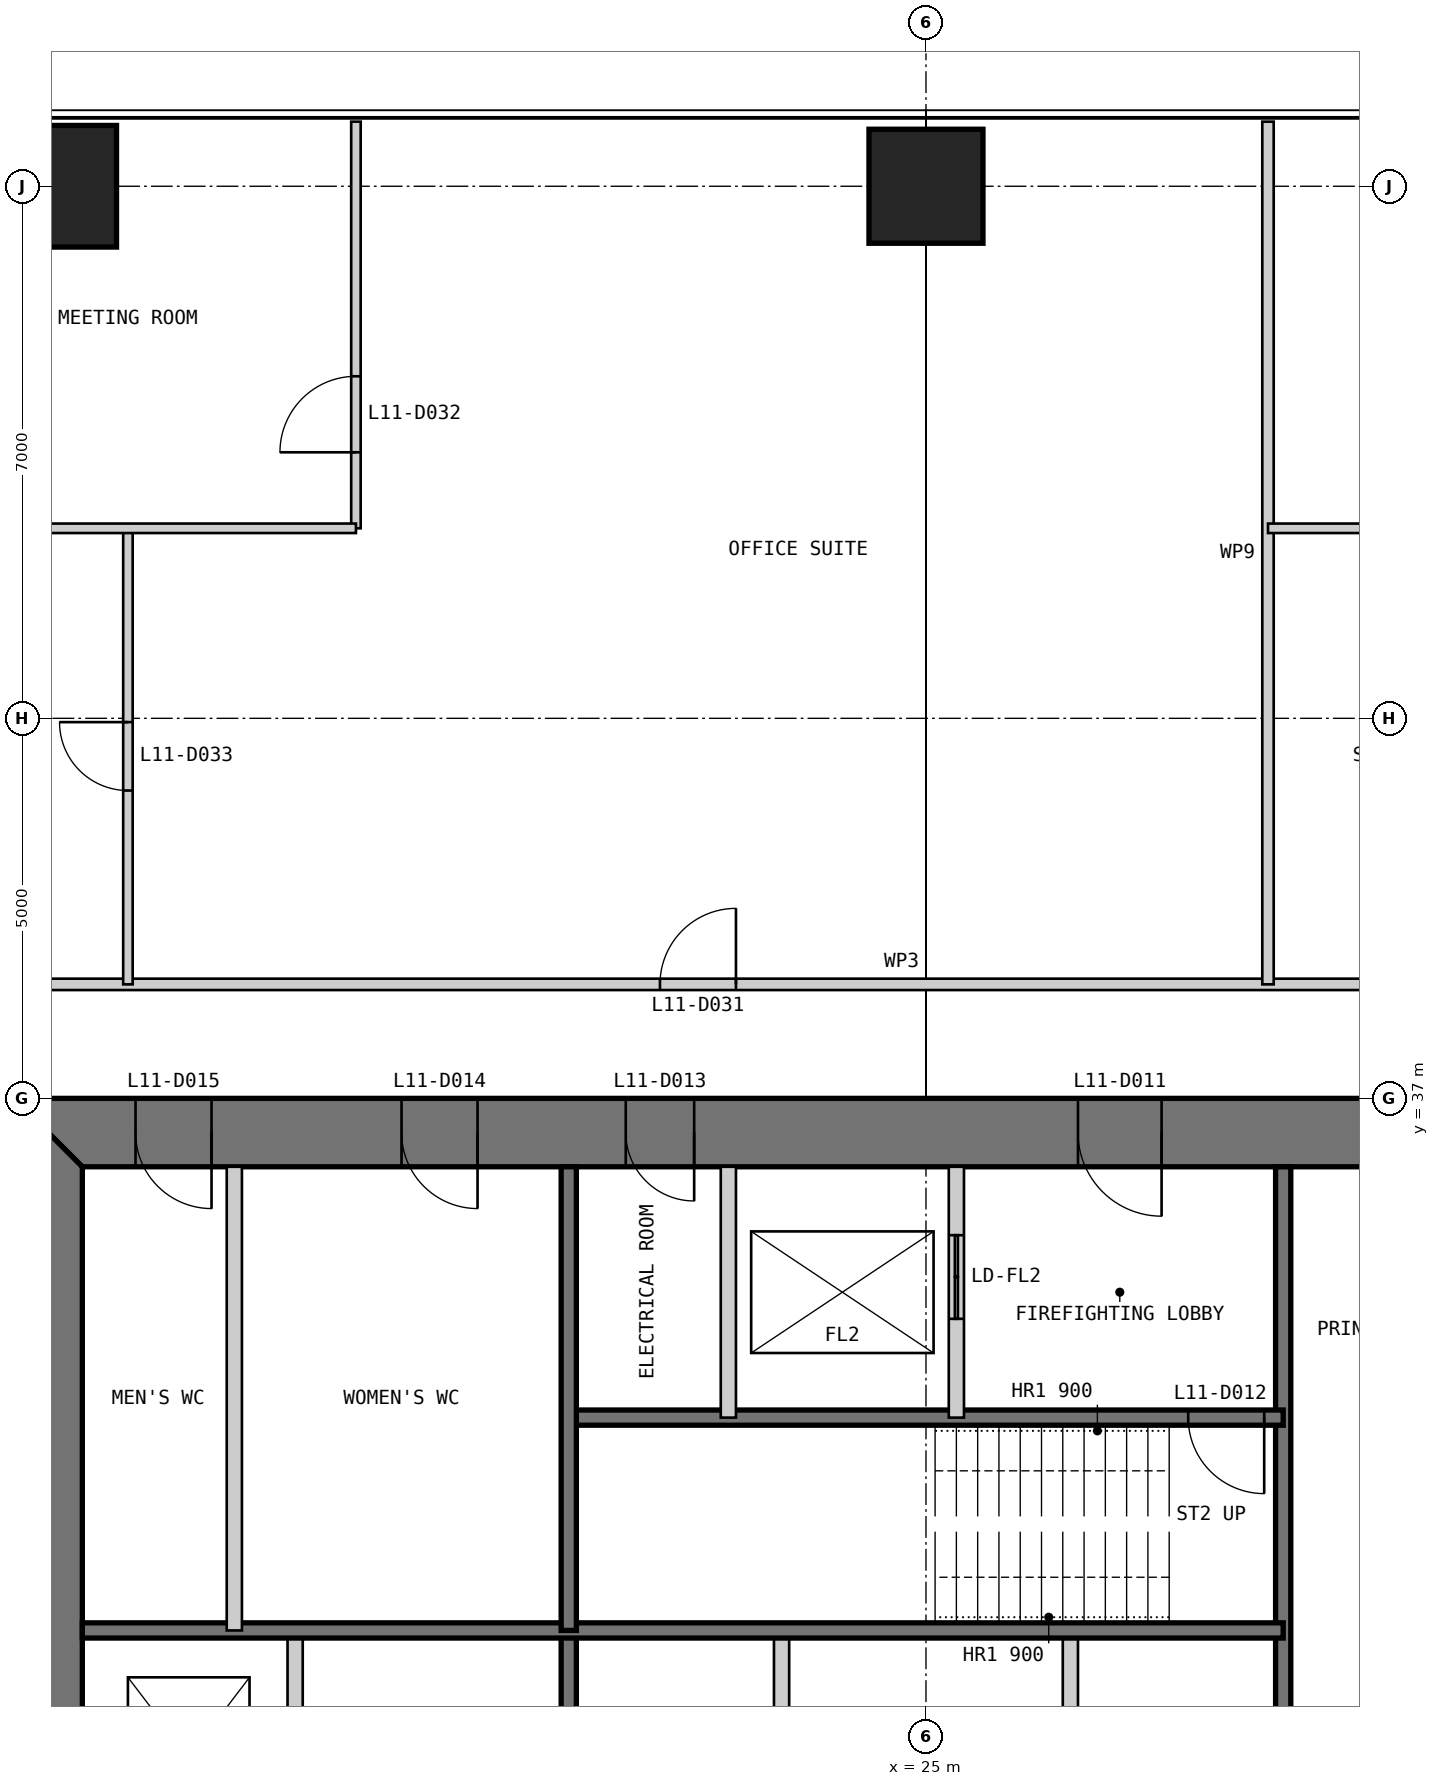
"""IFC4 building model, lengths in metres.
Left out: names, types, materials, properties, quantities, classifications, styles, units other than length and angle.
Written with IfcOpenShell. Run it as: python <this file> out.ifc"""

import sys

from ifc_helpers import new_model, si_unit, direction, frame, frame_2d, origin, origin_2d, place, context, subcontext, project, spatial, polyline, rectangle, outline, extrude, element, fill, save


model = new_model("IFC4")
c1 = context("Model", 3, precision=1e-05, world=origin(), true_north=direction((0.0, 1.0)))
c2 = subcontext(c1, "Body", "Model", "MODEL_VIEW")
j1 = project(units=[si_unit("LENGTHUNIT", "METRE"), si_unit("PLANEANGLEUNIT", "RADIAN")], contexts=[c1])
p1 = place(None, origin())
s1 = spatial("IfcSite", under=j1, at=p1, CompositionType="ELEMENT")
p2 = place(p1, origin())
s2 = spatial("IfcBuilding", under=s1, at=p2, CompositionType="ELEMENT")
p3 = place(p2, frame((0.0, 0.0, 51.0)))
s3 = spatial("IfcBuildingStorey", under=s2, at=p3, CompositionType="ELEMENT", Elevation=51.0)
p4 = place(p3, frame((25.0, 49.0, 0.0), z_axis=(0.0, 0.0, 1.0), x_axis=(1.0, 0.0, 0.0)))
e1 = element("IfcColumn", 1, at=p4, inside=s3, PredefinedType="COLUMN", context=c2, shape_type="SweptSolid", body=[
    extrude(rectangle(XDim=1.5, YDim=1.5, at=origin_2d()), origin(), (0.0, 0.0, 1.0), 4.0),
])
p5 = place(p3, frame((13.0, 49.0, 0.0), z_axis=(0.0, 0.0, 1.0), x_axis=(1.0, 0.0, 0.0)))
e2 = element("IfcColumn", 2, at=p5, inside=s3, PredefinedType="COLUMN", context=c2, shape_type="SweptSolid", body=[
    extrude(rectangle(XDim=2.7, YDim=1.6, at=origin_2d()), origin(), (0.0, 0.0, 1.0), 4.0),
])
p6 = place(p3, frame((37.0, 36.55, 0.0), z_axis=(0.0, 0.0, 1.0), x_axis=(-1.0, 0.0, 0.0)))
e3 = element("IfcWall", 3, at=p6, inside=s3, PredefinedType="SHEAR", context=c2, shape_type="SweptSolid", body=[
    extrude(outline(polyline([(0.0, -0.45), (24.0, -0.45), (23.1, 0.45), (0.9, 0.45), (0.0, -0.45)])), origin(), (0.0, 0.0, 1.0), 4.0),
])
p7 = place(p6, frame((4.9, 0.0, 0.0)))
e4 = element("IfcOpeningElement", 4, at=p7, cuts=e3, PredefinedType="OPENING", context=c2, shape_type="SweptSolid", body=[
    extrude(rectangle(XDim=1.0, YDim=2.2, at=frame_2d((0.5, 1.1))), frame((0.0, 0.46, 0.0), z_axis=(0.0, -1.0, 0.0), x_axis=(1.0, 0.0, 0.0)), (0.0, 0.0, 1.0), 0.92),
])
p8 = place(p6, frame((8.9, 0.0, 0.0)))
e5 = element("IfcOpeningElement", 5, at=p8, cuts=e3, PredefinedType="OPENING", context=c2, shape_type="SweptSolid", body=[
    extrude(rectangle(XDim=1.1, YDim=2.2, at=frame_2d((0.55, 1.1))), frame((0.0, 0.46, 0.0), z_axis=(0.0, -1.0, 0.0), x_axis=(1.0, 0.0, 0.0)), (0.0, 0.0, 1.0), 0.92),
])
p9 = place(p6, frame((15.05, 0.0, 0.0)))
e6 = element("IfcOpeningElement", 6, at=p9, cuts=e3, PredefinedType="OPENING", context=c2, shape_type="SweptSolid", body=[
    extrude(rectangle(XDim=0.9, YDim=2.2, at=frame_2d((0.45, 1.1))), frame((0.0, 0.46, 0.0), z_axis=(0.0, -1.0, 0.0), x_axis=(1.0, 0.0, 0.0)), (0.0, 0.0, 1.0), 0.92),
])
p10 = place(p6, frame((17.9, 0.0, 0.0)))
e7 = element("IfcOpeningElement", 7, at=p10, cuts=e3, PredefinedType="OPENING", context=c2, shape_type="SweptSolid", body=[
    extrude(rectangle(XDim=1.0, YDim=2.2, at=frame_2d((0.5, 1.1))), frame((0.0, 0.46, 0.0), z_axis=(0.0, -1.0, 0.0), x_axis=(1.0, 0.0, 0.0)), (0.0, 0.0, 1.0), 0.92),
])
p11 = place(p6, frame((21.4, 0.0, 0.0)))
e8 = element("IfcOpeningElement", 8, at=p11, cuts=e3, PredefinedType="OPENING", context=c2, shape_type="SweptSolid", body=[
    extrude(rectangle(XDim=1.0, YDim=2.2, at=frame_2d((0.5, 1.1))), frame((0.0, 0.46, 0.0), z_axis=(0.0, -1.0, 0.0), x_axis=(1.0, 0.0, 0.0)), (0.0, 0.0, 1.0), 0.92),
])
p12 = place(p3, frame((13.45, 36.1, 0.0), z_axis=(0.0, 0.0, 1.0), x_axis=(0.0, -1.0, 0.0)))
e9 = element("IfcWall", 9, at=p12, inside=s3, PredefinedType="SHEAR", context=c2, shape_type="SweptSolid", body=[
    extrude(outline(polyline([(-0.9, -0.45), (23.1, -0.45), (22.2, 0.45), (0.0, 0.45), (-0.9, -0.45)])), origin(), (0.0, 0.0, 1.0), 4.0),
])
p13 = place(p12, frame((20.2, 0.0, 0.0)))
e10 = element("IfcOpeningElement", 10, at=p13, cuts=e9, PredefinedType="OPENING", context=c2, shape_type="SweptSolid", body=[
    extrude(rectangle(XDim=1.0, YDim=2.2, at=frame_2d((0.5, 1.1))), frame((0.0, 0.46, 0.0), z_axis=(0.0, -1.0, 0.0), x_axis=(1.0, 0.0, 0.0)), (0.0, 0.0, 1.0), 0.92),
])
p14 = place(p12, frame((17.25, 0.0, 0.0)))
e11 = element("IfcOpeningElement", 11, at=p14, cuts=e9, PredefinedType="OPENING", context=c2, shape_type="SweptSolid", body=[
    extrude(rectangle(XDim=0.9, YDim=2.2, at=frame_2d((0.45, 1.1))), frame((0.0, 0.46, 0.0), z_axis=(0.0, -1.0, 0.0), x_axis=(1.0, 0.0, 0.0)), (0.0, 0.0, 1.0), 0.92),
])
p15 = place(p3, frame((16.7, 13.9, 0.0), z_axis=(0.0, 0.0, 1.0), x_axis=(0.0, 1.0, 0.0)))
e12 = element("IfcWall", 12, at=p15, inside=s3, PredefinedType="PARTITIONING", context=c2, shape_type="SweptSolid", body=[
    extrude(rectangle(XDim=16.1, YDim=0.2, at=frame_2d((8.05, 0.0))), origin(), (0.0, 0.0, 1.0), 3.8),
])
p16 = place(p15, frame((4.1, 0.0, 0.0)))
e13 = element("IfcOpeningElement", 13, at=p16, cuts=e12, PredefinedType="OPENING", context=c2, shape_type="SweptSolid", body=[
    extrude(rectangle(XDim=0.9, YDim=2.2, at=frame_2d((0.45, 1.1))), frame((0.0, 0.11, 0.0), z_axis=(0.0, -1.0, 0.0), x_axis=(1.0, 0.0, 0.0)), (0.0, 0.0, 1.0), 0.22),
])
p17 = place(p15, frame((7.217, 0.0, 0.0)))
e14 = element("IfcOpeningElement", 14, at=p17, cuts=e12, PredefinedType="OPENING", context=c2, shape_type="SweptSolid", body=[
    extrude(rectangle(XDim=1.1, YDim=2.2, at=frame_2d((0.55, 1.1))), frame((0.0, 0.11, 0.0), z_axis=(0.0, -1.0, 0.0), x_axis=(1.0, 0.0, 0.0)), (0.0, 0.0, 1.0), 0.22),
])
p18 = place(p15, frame((10.55, 0.0, 0.0)))
e15 = element("IfcOpeningElement", 15, at=p18, cuts=e12, PredefinedType="OPENING", context=c2, shape_type="SweptSolid", body=[
    extrude(rectangle(XDim=1.1, YDim=2.2, at=frame_2d((0.55, 1.1))), frame((0.0, 0.11, 0.0), z_axis=(0.0, -1.0, 0.0), x_axis=(1.0, 0.0, 0.0)), (0.0, 0.0, 1.0), 0.22),
])
p19 = place(p15, frame((13.883, 0.0, 0.0)))
e16 = element("IfcOpeningElement", 16, at=p19, cuts=e12, PredefinedType="OPENING", context=c2, shape_type="SweptSolid", body=[
    extrude(rectangle(XDim=1.1, YDim=2.2, at=frame_2d((0.55, 1.1))), frame((0.0, 0.11, 0.0), z_axis=(0.0, -1.0, 0.0), x_axis=(1.0, 0.0, 0.0)), (0.0, 0.0, 1.0), 0.22),
])
p20 = place(p3, frame((20.3, 13.9, 0.0), z_axis=(0.0, 0.0, 1.0), x_axis=(0.0, 1.0, 0.0)))
e17 = element("IfcWall", 17, at=p20, inside=s3, PredefinedType="SOLIDWALL", context=c2, shape_type="SweptSolid", body=[
    extrude(rectangle(XDim=16.1, YDim=0.2, at=frame_2d((8.05, 0.0))), origin(), (0.0, 0.0, 1.0), 3.8),
])
p21 = place(p3, frame((23.1, 20.0, 0.0), z_axis=(0.0, 0.0, 1.0), x_axis=(0.0, 1.0, 0.0)))
e18 = element("IfcWall", 18, at=p21, inside=s3, PredefinedType="PARTITIONING", context=c2, shape_type="SweptSolid", body=[
    extrude(rectangle(XDim=10.0, YDim=0.2, at=frame_2d((5.0, 0.0))), origin(), (0.0, 0.0, 1.0), 3.8),
])
p22 = place(p3, frame((29.7, 36.1, 0.0), z_axis=(0.0, 0.0, 1.0), x_axis=(0.0, -1.0, 0.0)))
e19 = element("IfcWall", 19, at=p22, inside=s3, PredefinedType="SOLIDWALL", context=c2, shape_type="SweptSolid", body=[
    extrude(rectangle(XDim=16.1, YDim=0.2, at=frame_2d((8.05, 0.0))), origin(), (0.0, 0.0, 1.0), 3.8),
])
p23 = place(p3, frame((26.9, 30.0, 0.0), z_axis=(0.0, 0.0, 1.0), x_axis=(0.0, -1.0, 0.0)))
e20 = element("IfcWall", 20, at=p23, inside=s3, PredefinedType="PARTITIONING", context=c2, shape_type="SweptSolid", body=[
    extrude(rectangle(XDim=10.0, YDim=0.2, at=frame_2d((5.0, 0.0))), origin(), (0.0, 0.0, 1.0), 3.8),
])
p24 = place(p3, frame((29.7, 32.8, 0.0), z_axis=(0.0, 0.0, 1.0), x_axis=(-1.0, 0.0, 0.0)))
e21 = element("IfcWall", 21, at=p24, inside=s3, PredefinedType="SOLIDWALL", context=c2, shape_type="SweptSolid", body=[
    extrude(rectangle(XDim=9.4, YDim=0.2, at=frame_2d((4.7, 0.0))), origin(), (0.0, 0.0, 1.0), 3.8),
])
p25 = place(p24, frame((0.25, 0.0, 0.0)))
e22 = element("IfcOpeningElement", 22, at=p25, cuts=e21, PredefinedType="OPENING", context=c2, shape_type="SweptSolid", body=[
    extrude(rectangle(XDim=1.0, YDim=2.2, at=frame_2d((0.5, 1.1))), frame((0.0, 0.11, 0.0), z_axis=(0.0, -1.0, 0.0), x_axis=(1.0, 0.0, 0.0)), (0.0, 0.0, 1.0), 0.22),
])
p26 = place(p3, frame((29.7, 30.0, 0.0), z_axis=(0.0, 0.0, 1.0), x_axis=(-1.0, 0.0, 0.0)))
e23 = element("IfcWall", 23, at=p26, inside=s3, PredefinedType="SOLIDWALL", context=c2, shape_type="SweptSolid", body=[
    extrude(rectangle(XDim=15.8, YDim=0.2, at=frame_2d((7.9, 0.0))), origin(), (0.0, 0.0, 1.0), 3.8),
])
p27 = place(p3, frame((25.4, 36.1, 0.0), z_axis=(0.0, 0.0, 1.0), x_axis=(0.0, -1.0, 0.0)))
e24 = element("IfcWall", 24, at=p27, inside=s3, PredefinedType="PARTITIONING", context=c2, shape_type="SweptSolid", body=[
    extrude(rectangle(XDim=3.3, YDim=0.2, at=frame_2d((1.65, 0.0))), origin(), (0.0, 0.0, 1.0), 3.8),
])
p28 = place(p27, frame((0.9, 0.0, 0.0)))
e25 = element("IfcOpeningElement", 25, at=p28, cuts=e24, PredefinedType="OPENING", context=c2, shape_type="SweptSolid", body=[
    extrude(rectangle(XDim=1.1, YDim=2.2, at=frame_2d((0.55, 1.1))), frame((0.0, 0.11, 0.0), z_axis=(0.0, -1.0, 0.0), x_axis=(1.0, 0.0, 0.0)), (0.0, 0.0, 1.0), 0.22),
])
p29 = place(p3, frame((22.4, 36.1, 0.0), z_axis=(0.0, 0.0, 1.0), x_axis=(0.0, -1.0, 0.0)))
e26 = element("IfcWall", 26, at=p29, inside=s3, PredefinedType="PARTITIONING", context=c2, shape_type="SweptSolid", body=[
    extrude(rectangle(XDim=3.3, YDim=0.2, at=frame_2d((1.65, 0.0))), origin(), (0.0, 0.0, 1.0), 3.8),
])
p30 = place(p3, frame((20.3, 36.1, 0.0), z_axis=(0.0, 0.0, 1.0), x_axis=(0.0, -1.0, 0.0)))
e27 = element("IfcWall", 27, at=p30, inside=s3, PredefinedType="SOLIDWALL", context=c2, shape_type="SweptSolid", body=[
    extrude(rectangle(XDim=6.1, YDim=0.2, at=frame_2d((3.05, 0.0))), origin(), (0.0, 0.0, 1.0), 3.8),
])
p31 = place(p3, frame((15.9, 36.1, 0.0), z_axis=(0.0, 0.0, 1.0), x_axis=(0.0, -1.0, 0.0)))
e28 = element("IfcWall", 28, at=p31, inside=s3, PredefinedType="PARTITIONING", context=c2, shape_type="SweptSolid", body=[
    extrude(rectangle(XDim=6.1, YDim=0.2, at=frame_2d((3.05, 0.0))), origin(), (0.0, 0.0, 1.0), 3.8),
])
p32 = place(p3, frame((38.5, 38.5, 0.0), z_axis=(0.0, 0.0, 1.0), x_axis=(-1.0, 0.0, 0.0)))
e29 = element("IfcWall", 29, at=p32, inside=s3, PredefinedType="PARTITIONING", context=c2, shape_type="SweptSolid", body=[
    extrude(rectangle(XDim=27.0, YDim=0.15, at=frame_2d((13.5, 0.0))), origin(), (0.0, 0.0, 1.0), 3.85),
])
p33 = place(p32, frame((2.5, 0.0, 0.0)))
e30 = element("IfcOpeningElement", 30, at=p33, cuts=e29, PredefinedType="OPENING", context=c2, shape_type="SweptSolid", body=[
    extrude(rectangle(XDim=1.0, YDim=2.2, at=frame_2d((0.5, 1.1))), frame((0.0, 0.085, 0.0), z_axis=(0.0, -1.0, 0.0), x_axis=(1.0, 0.0, 0.0)), (0.0, 0.0, 1.0), 0.17),
])
p34 = place(p32, frame((16.0, 0.0, 0.0)))
e31 = element("IfcOpeningElement", 31, at=p34, cuts=e29, PredefinedType="OPENING", context=c2, shape_type="SweptSolid", body=[
    extrude(rectangle(XDim=1.0, YDim=2.2, at=frame_2d((0.5, 1.1))), frame((0.0, 0.085, 0.0), z_axis=(0.0, -1.0, 0.0), x_axis=(1.0, 0.0, 0.0)), (0.0, 0.0, 1.0), 0.17),
])
p35 = place(p3, frame((29.5, 49.85, 0.0), z_axis=(0.0, 0.0, 1.0), x_axis=(0.0, -1.0, 0.0)))
e32 = element("IfcWall", 32, at=p35, inside=s3, PredefinedType="PARTITIONING", context=c2, shape_type="SweptSolid", body=[
    extrude(rectangle(XDim=11.35, YDim=0.15, at=frame_2d((5.675, 0.0))), origin(), (0.0, 0.0, 1.0), 3.85),
])
p36 = place(p3, frame((17.5, 49.85, 0.0), z_axis=(0.0, 0.0, 1.0), x_axis=(0.0, -1.0, 0.0)))
e33 = element("IfcWall", 33, at=p36, inside=s3, PredefinedType="PARTITIONING", context=c2, shape_type="SweptSolid", body=[
    extrude(rectangle(XDim=5.35, YDim=0.125, at=frame_2d((2.675, 0.0))), origin(), (0.0, 0.0, 1.0), 3.85),
])
p37 = place(p36, frame((3.35, 0.0, 0.0)))
e34 = element("IfcOpeningElement", 34, at=p37, cuts=e33, PredefinedType="OPENING", context=c2, shape_type="SweptSolid", body=[
    extrude(rectangle(XDim=1.0, YDim=2.2, at=frame_2d((0.5, 1.1))), frame((0.0, 0.073, 0.0), z_axis=(0.0, -1.0, 0.0), x_axis=(1.0, 0.0, 0.0)), (0.0, 0.0, 1.0), 0.145),
])
p38 = place(p3, frame((14.5, 44.5, 0.0), z_axis=(0.0, 0.0, 1.0), x_axis=(0.0, -1.0, 0.0)))
e35 = element("IfcWall", 35, at=p38, inside=s3, PredefinedType="PARTITIONING", context=c2, shape_type="SweptSolid", body=[
    extrude(rectangle(XDim=6.0, YDim=0.125, at=frame_2d((3.0, 0.0))), origin(), (0.0, 0.0, 1.0), 3.85),
])
p39 = place(p38, frame((2.55, 0.0, 0.0)))
e36 = element("IfcOpeningElement", 36, at=p39, cuts=e35, PredefinedType="OPENING", context=c2, shape_type="SweptSolid", body=[
    extrude(rectangle(XDim=0.9, YDim=2.2, at=frame_2d((0.45, 1.1))), frame((0.0, 0.073, 0.0), z_axis=(0.0, -1.0, 0.0), x_axis=(1.0, 0.0, 0.0)), (0.0, 0.0, 1.0), 0.145),
])
p40 = place(p3, frame((32.5, 44.5, 0.0), z_axis=(0.0, 0.0, 1.0), x_axis=(-1.0, 0.0, 0.0)))
e37 = element("IfcWall", 37, at=p40, inside=s3, PredefinedType="PARTITIONING", context=c2, shape_type="SweptSolid", body=[
    extrude(rectangle(XDim=3.0, YDim=0.125, at=frame_2d((1.5, 0.0))), origin(), (0.0, 0.0, 1.0), 3.85),
])
p41 = place(p3, frame((17.5, 44.5, 0.0), z_axis=(0.0, 0.0, 1.0), x_axis=(-1.0, 0.0, 0.0)))
e38 = element("IfcWall", 38, at=p41, inside=s3, PredefinedType="PARTITIONING", context=c2, shape_type="SweptSolid", body=[
    extrude(rectangle(XDim=6.0, YDim=0.125, at=frame_2d((3.0, 0.0))), origin(), (0.0, 0.0, 1.0), 3.85),
])
p42 = place(p8, origin())
e39 = element("IfcDoor", 39, at=p42, inside=s3, OperationType="SINGLE_SWING_LEFT", PredefinedType="DOOR", context=c2, shape_type="SweptSolid", body=[
    extrude(rectangle(XDim=1.1, YDim=2.2, at=frame_2d((0.55, 1.1))), frame((0.0, 0.025, 0.0), z_axis=(0.0, -1.0, 0.0), x_axis=(1.0, 0.0, 0.0)), (0.0, 0.0, 1.0), 0.05),
    extrude(outline(polyline([(0.0, 0.0), (0.04, 0.0), (0.04, 2.16), (1.06, 2.16), (1.06, 0.0), (1.1, 0.0), (1.1, 2.2), (0.0, 2.2), (0.0, 0.0)])), frame((0.0, 0.3, 0.0), z_axis=(0.0, -1.0, 0.0), x_axis=(1.0, 0.0, 0.0)), (0.0, 0.0, 1.0), 0.6),
])
fill(e5, e39)
p43 = place(p25, origin())
e40 = element("IfcDoor", 40, at=p43, inside=s3, OperationType="SINGLE_SWING_LEFT", PredefinedType="DOOR", context=c2, shape_type="SweptSolid", body=[
    extrude(rectangle(XDim=1.0, YDim=2.2, at=frame_2d((0.5, 1.1))), frame((0.0, 0.025, 0.0), z_axis=(0.0, -1.0, 0.0), x_axis=(1.0, 0.0, 0.0)), (0.0, 0.0, 1.0), 0.05),
])
fill(e22, e40)
p44 = place(p9, origin())
e41 = element("IfcDoor", 41, at=p44, inside=s3, OperationType="SINGLE_SWING_LEFT", PredefinedType="DOOR", context=c2, shape_type="SweptSolid", body=[
    extrude(rectangle(XDim=0.9, YDim=2.2, at=frame_2d((0.45, 1.1))), frame((0.0, 0.025, 0.0), z_axis=(0.0, -1.0, 0.0), x_axis=(1.0, 0.0, 0.0)), (0.0, 0.0, 1.0), 0.05),
    extrude(outline(polyline([(0.0, 0.0), (0.04, 0.0), (0.04, 2.16), (0.86, 2.16), (0.86, 0.0), (0.9, 0.0), (0.9, 2.2), (0.0, 2.2), (0.0, 0.0)])), frame((0.0, 0.3, 0.0), z_axis=(0.0, -1.0, 0.0), x_axis=(1.0, 0.0, 0.0)), (0.0, 0.0, 1.0), 0.6),
])
fill(e6, e41)
p45 = place(p10, origin())
e42 = element("IfcDoor", 42, at=p45, inside=s3, OperationType="SINGLE_SWING_LEFT", PredefinedType="DOOR", context=c2, shape_type="SweptSolid", body=[
    extrude(rectangle(XDim=1.0, YDim=2.2, at=frame_2d((0.5, 1.1))), frame((0.0, 0.025, 0.0), z_axis=(0.0, -1.0, 0.0), x_axis=(1.0, 0.0, 0.0)), (0.0, 0.0, 1.0), 0.05),
    extrude(outline(polyline([(0.0, 0.0), (0.04, 0.0), (0.04, 2.16), (0.96, 2.16), (0.96, 0.0), (1.0, 0.0), (1.0, 2.2), (0.0, 2.2), (0.0, 0.0)])), frame((0.0, 0.3, 0.0), z_axis=(0.0, -1.0, 0.0), x_axis=(1.0, 0.0, 0.0)), (0.0, 0.0, 1.0), 0.6),
])
fill(e7, e42)
p46 = place(p11, origin())
e43 = element("IfcDoor", 43, at=p46, inside=s3, OperationType="SINGLE_SWING_LEFT", PredefinedType="DOOR", context=c2, shape_type="SweptSolid", body=[
    extrude(rectangle(XDim=1.0, YDim=2.2, at=frame_2d((0.5, 1.1))), frame((0.0, 0.025, 0.0), z_axis=(0.0, -1.0, 0.0), x_axis=(1.0, 0.0, 0.0)), (0.0, 0.0, 1.0), 0.05),
    extrude(outline(polyline([(0.0, 0.0), (0.04, 0.0), (0.04, 2.16), (0.96, 2.16), (0.96, 0.0), (1.0, 0.0), (1.0, 2.2), (0.0, 2.2), (0.0, 0.0)])), frame((0.0, 0.3, 0.0), z_axis=(0.0, -1.0, 0.0), x_axis=(1.0, 0.0, 0.0)), (0.0, 0.0, 1.0), 0.6),
])
fill(e8, e43)
p47 = place(p34, frame((1.0, 0.0, 0.0), z_axis=(0.0, 0.0, 1.0), x_axis=(-1.0, 0.0, 0.0)))
e44 = element("IfcDoor", 44, at=p47, inside=s3, OperationType="SINGLE_SWING_RIGHT", PredefinedType="DOOR", context=c2, shape_type="SweptSolid", body=[
    extrude(rectangle(XDim=1.0, YDim=2.2, at=frame_2d((0.5, 1.1))), frame((0.0, 0.025, 0.0), z_axis=(0.0, -1.0, 0.0), x_axis=(1.0, 0.0, 0.0)), (0.0, 0.0, 1.0), 0.05),
])
fill(e31, e44)
p48 = place(p37, frame((1.0, 0.0, 0.0), z_axis=(0.0, 0.0, 1.0), x_axis=(-1.0, 0.0, 0.0)))
e45 = element("IfcDoor", 45, at=p48, inside=s3, OperationType="SINGLE_SWING_LEFT", PredefinedType="DOOR", context=c2, shape_type="SweptSolid", body=[
    extrude(rectangle(XDim=1.0, YDim=2.2, at=frame_2d((0.5, 1.1))), frame((0.0, 0.025, 0.0), z_axis=(0.0, -1.0, 0.0), x_axis=(1.0, 0.0, 0.0)), (0.0, 0.0, 1.0), 0.05),
])
fill(e34, e45)
p49 = place(p39, frame((0.9, 0.0, 0.0), z_axis=(0.0, 0.0, 1.0), x_axis=(-1.0, 0.0, 0.0)))
e46 = element("IfcDoor", 46, at=p49, inside=s3, OperationType="SINGLE_SWING_RIGHT", PredefinedType="DOOR", context=c2, shape_type="SweptSolid", body=[
    extrude(rectangle(XDim=0.9, YDim=2.2, at=frame_2d((0.45, 1.1))), frame((0.0, 0.025, 0.0), z_axis=(0.0, -1.0, 0.0), x_axis=(1.0, 0.0, 0.0)), (0.0, 0.0, 1.0), 0.05),
])
fill(e36, e46)
p50 = place(p28, origin())
e47 = element("IfcDoor", 47, at=p50, inside=s3, OperationType="DOUBLE_DOOR_SLIDING", PredefinedType="DOOR", context=c2, shape_type="SweptSolid", body=[
    extrude(rectangle(XDim=1.1, YDim=2.2, at=frame_2d((0.55, 1.1))), frame((0.0, 0.025, 0.0), z_axis=(0.0, -1.0, 0.0), x_axis=(1.0, 0.0, 0.0)), (0.0, 0.0, 1.0), 0.05),
])
fill(e25, e47)
save(model, sys.argv[1])
